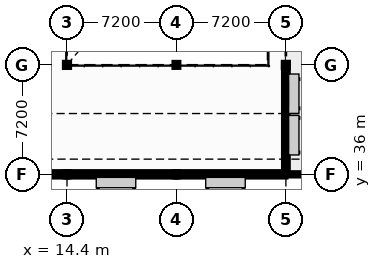
"""IFC4 building model, lengths in metres.
Left out: names, types, materials, properties, quantities, classifications, styles, units other than length and angle.
Written with IfcOpenShell. Run it as: python <this file> out.ifc"""

import sys

from ifc_helpers import new_model, si_unit, direction, frame, frame_2d, origin, origin_2d, place, context, subcontext, project, spatial, rectangle, hollow_circle, i_section, extrude, element, fill, save


model = new_model("IFC4")
c1 = context("Model", 3, precision=1e-05, world=origin(), true_north=direction((0.0, 1.0)))
c2 = subcontext(c1, "Body", "Model", "MODEL_VIEW")
j1 = project(units=[si_unit("LENGTHUNIT", "METRE"), si_unit("PLANEANGLEUNIT", "RADIAN")], contexts=[c1])
p1 = place(None, origin())
s1 = spatial("IfcSite", under=j1, at=p1, CompositionType="ELEMENT")
p2 = place(p1, origin())
s2 = spatial("IfcBuilding", under=s1, at=p2, CompositionType="ELEMENT")
p3 = place(p2, frame((0.0, 0.0, 12.78)))
s3 = spatial("IfcBuildingStorey", under=s2, at=p3, CompositionType="ELEMENT", Elevation=12.78)
p4 = place(p3, frame((14.4, 36.0, 0.0), z_axis=(0.0, 0.0, 1.0), x_axis=(1.0, 0.0, 0.0)))
e1 = element("IfcColumn", 1, at=p4, inside=s3, PredefinedType="COLUMN", context=c2, shape_type="SweptSolid", body=[
    extrude(i_section(OverallWidth=0.307, OverallDepth=0.315, WebThickness=0.012, FlangeThickness=0.019, at=origin_2d()), origin(), (0.0, 0.0, 1.0), 3.74),
])
p5 = place(p3, frame((14.4, 43.2, 0.0), z_axis=(0.0, 0.0, 1.0), x_axis=(1.0, 0.0, 0.0)))
e2 = element("IfcColumn", 2, at=p5, inside=s3, PredefinedType="COLUMN", context=c2, shape_type="SweptSolid", body=[
    extrude(hollow_circle(Radius=0.162, WallThickness=0.012, at=origin_2d()), origin(), (0.0, 0.0, 1.0), 3.74),
])
for number, where, z_axis, x_axis in (
    (3, (21.6, 36.0, 0.0), (0.0, 0.0, 1.0), (1.0, 0.0, 0.0)),
    (4, (21.6, 43.2, 0.0), (0.0, 0.0, 1.0), (1.0, 0.0, 0.0)),
):
    element("IfcColumn", number, at=place(p3, frame(where, z_axis=z_axis, x_axis=x_axis)), inside=s3, PredefinedType="COLUMN", context=c2, shape_type="SweptSolid", body=[
        extrude(i_section(OverallWidth=0.307, OverallDepth=0.315, WebThickness=0.012, FlangeThickness=0.019, at=origin_2d()), origin(), (0.0, 0.0, 1.0), 3.74),
    ])
p6 = place(p3, frame((28.8, 43.2, 0.0), z_axis=(0.0, 0.0, 1.0), x_axis=(1.0, 0.0, 0.0)))
e5 = element("IfcColumn", 5, at=p6, inside=s3, PredefinedType="COLUMN", context=c2, shape_type="SweptSolid", body=[
    extrude(hollow_circle(Radius=0.162, WallThickness=0.012, at=origin_2d()), origin(), (0.0, 0.0, 1.0), 3.74),
])
p7 = place(p3, frame((28.8, 36.0, 0.0), z_axis=(0.0, 0.0, 1.0), x_axis=(0.0, 1.0, 0.0)))
e6 = element("IfcWall", 6, at=p7, inside=s3, PredefinedType="SOLIDWALL", context=c2, shape_type="SweptSolid", body=[
    extrude(rectangle(XDim=7.2, YDim=0.3, at=frame_2d((3.6, 0.0))), origin(), (0.0, 0.0, 1.0), 3.42),
])
p8 = place(p7, frame((1.6, 0.0, 0.85)))
e7 = element("IfcOpeningElement", 7, at=p8, cuts=e6, PredefinedType="OPENING", context=c2, shape_type="SweptSolid", body=[
    extrude(rectangle(XDim=1.95, YDim=2.1, at=frame_2d((0.975, 1.05))), frame((0.0, 0.16, 0.0), z_axis=(0.0, -1.0, 0.0), x_axis=(1.0, 0.0, 0.0)), (0.0, 0.0, 1.0), 0.32),
])
p9 = place(p7, frame((4.5, 0.0, 0.85)))
e8 = element("IfcOpeningElement", 8, at=p9, cuts=e6, PredefinedType="OPENING", context=c2, shape_type="SweptSolid", body=[
    extrude(rectangle(XDim=1.6, YDim=2.05, at=frame_2d((0.8, 1.025))), frame((0.0, 0.16, 0.0), z_axis=(0.0, -1.0, 0.0), x_axis=(1.0, 0.0, 0.0)), (0.0, 0.0, 1.0), 0.32),
])
p10 = place(p3, frame((7.2, 36.0, 0.0), z_axis=(0.0, 0.0, 1.0), x_axis=(1.0, 0.0, 0.0)))
e9 = element("IfcWall", 9, at=p10, inside=s3, PredefinedType="SOLIDWALL", context=c2, shape_type="SweptSolid", body=[
    extrude(rectangle(XDim=7.2, YDim=0.34, at=frame_2d((3.6, 0.0))), origin(), (0.0, 0.0, 1.0), 3.42),
])
p11 = place(p10, frame((4.4, 0.0, 0.9)))
e10 = element("IfcOpeningElement", 10, at=p11, cuts=e9, PredefinedType="OPENING", context=c2, shape_type="SweptSolid", body=[
    extrude(rectangle(XDim=2.05, YDim=1.85, at=frame_2d((1.025, 0.925))), frame((0.0, 0.18, 0.0), z_axis=(0.0, -1.0, 0.0), x_axis=(1.0, 0.0, 0.0)), (0.0, 0.0, 1.0), 0.36),
])
p12 = place(p3, frame((14.4, 36.0, 0.0), z_axis=(0.0, 0.0, 1.0), x_axis=(1.0, 0.0, 0.0)))
e11 = element("IfcWall", 11, at=p12, inside=s3, PredefinedType="SOLIDWALL", context=c2, shape_type="SweptSolid", body=[
    extrude(rectangle(XDim=7.2, YDim=0.34, at=frame_2d((3.6, 0.0))), origin(), (0.0, 0.0, 1.0), 3.42),
])
p13 = place(p12, frame((2.2, 0.0, 0.9)))
e12 = element("IfcOpeningElement", 12, at=p13, cuts=e11, PredefinedType="OPENING", context=c2, shape_type="SweptSolid", body=[
    extrude(rectangle(XDim=2.05, YDim=1.85, at=frame_2d((1.025, 0.925))), frame((0.0, 0.18, 0.0), z_axis=(0.0, -1.0, 0.0), x_axis=(1.0, 0.0, 0.0)), (0.0, 0.0, 1.0), 0.36),
])
p14 = place(p3, frame((21.6, 36.0, 0.0), z_axis=(0.0, 0.0, 1.0), x_axis=(1.0, 0.0, 0.0)))
e13 = element("IfcWall", 13, at=p14, inside=s3, PredefinedType="SOLIDWALL", context=c2, shape_type="SweptSolid", body=[
    extrude(rectangle(XDim=7.2, YDim=0.34, at=frame_2d((3.6, 0.0))), origin(), (0.0, 0.0, 1.0), 3.42),
])
p15 = place(p14, frame((2.2, 0.0, 0.9)))
e14 = element("IfcOpeningElement", 14, at=p15, cuts=e13, PredefinedType="OPENING", context=c2, shape_type="SweptSolid", body=[
    extrude(rectangle(XDim=2.05, YDim=1.85, at=frame_2d((1.025, 0.925))), frame((0.0, 0.18, 0.0), z_axis=(0.0, -1.0, 0.0), x_axis=(1.0, 0.0, 0.0)), (0.0, 0.0, 1.0), 0.36),
])
p16 = place(p3, frame((29.0, 36.0, 0.0), z_axis=(0.0, 0.0, 1.0), x_axis=(1.0, 0.0, 0.0)))
e15 = element("IfcWall", 15, at=p16, inside=s3, PredefinedType="PARAPET", context=c2, shape_type="SweptSolid", body=[
    extrude(rectangle(XDim=3.6, YDim=0.2, at=frame_2d((1.8, 0.0))), origin(), (0.0, 0.0, 1.0), 0.72),
])
p17 = place(p8, origin())
e16 = element("IfcWindow", 16, at=p17, inside=s3, PartitioningType="SINGLE_PANEL", PredefinedType="WINDOW", context=c2, shape_type="SweptSolid", body=[
    extrude(rectangle(XDim=1.95, YDim=2.1, at=frame_2d((0.975, 1.05))), frame((0.0, 0.03, 0.0), z_axis=(0.0, -1.0, 0.0), x_axis=(1.0, 0.0, 0.0)), (0.0, 0.0, 1.0), 0.06),
])
fill(e7, e16)
p18 = place(p9, origin())
e17 = element("IfcWindow", 17, at=p18, inside=s3, PartitioningType="SINGLE_PANEL", PredefinedType="WINDOW", context=c2, shape_type="SweptSolid", body=[
    extrude(rectangle(XDim=1.6, YDim=2.05, at=frame_2d((0.8, 1.025))), frame((0.0, 0.03, 0.0), z_axis=(0.0, -1.0, 0.0), x_axis=(1.0, 0.0, 0.0)), (0.0, 0.0, 1.0), 0.06),
])
fill(e8, e17)
p19 = place(p11, origin())
e18 = element("IfcWindow", 18, at=p19, inside=s3, PartitioningType="SINGLE_PANEL", PredefinedType="WINDOW", context=c2, shape_type="SweptSolid", body=[
    extrude(rectangle(XDim=2.05, YDim=1.85, at=frame_2d((1.025, 0.925))), frame((0.0, 0.03, 0.0), z_axis=(0.0, -1.0, 0.0), x_axis=(1.0, 0.0, 0.0)), (0.0, 0.0, 1.0), 0.06),
])
fill(e10, e18)
p20 = place(p13, origin())
e19 = element("IfcWindow", 19, at=p20, inside=s3, PartitioningType="SINGLE_PANEL", PredefinedType="WINDOW", context=c2, shape_type="SweptSolid", body=[
    extrude(rectangle(XDim=2.05, YDim=1.85, at=frame_2d((1.025, 0.925))), frame((0.0, 0.03, 0.0), z_axis=(0.0, -1.0, 0.0), x_axis=(1.0, 0.0, 0.0)), (0.0, 0.0, 1.0), 0.06),
])
fill(e12, e19)
p21 = place(p15, origin())
e20 = element("IfcWindow", 20, at=p21, inside=s3, PartitioningType="SINGLE_PANEL", PredefinedType="WINDOW", context=c2, shape_type="SweptSolid", body=[
    extrude(rectangle(XDim=2.05, YDim=1.85, at=frame_2d((1.025, 0.925))), frame((0.0, 0.03, 0.0), z_axis=(0.0, -1.0, 0.0), x_axis=(1.0, 0.0, 0.0)), (0.0, 0.0, 1.0), 0.06),
])
fill(e14, e20)
save(model, sys.argv[1])
